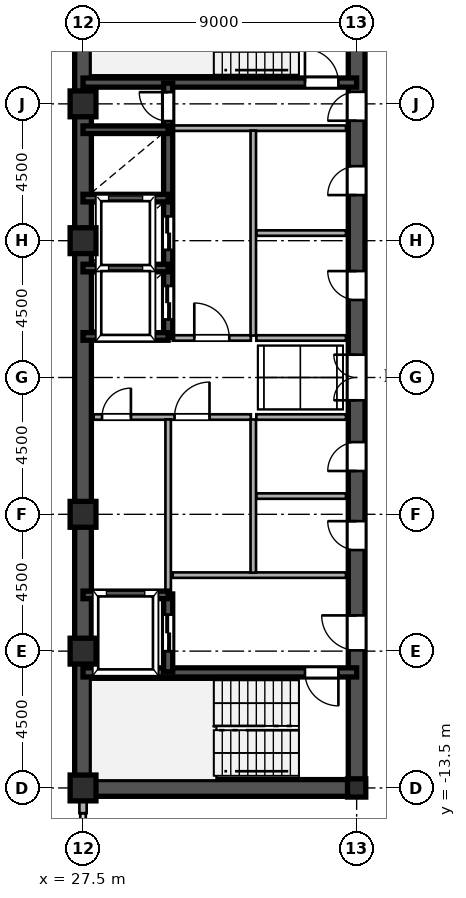
"""IFC4 building model, lengths in metres.
Left out: names, types, materials, properties, quantities, classifications, styles, units other than length and angle.
Written with IfcOpenShell. Run it as: python <this file> out.ifc"""

import sys

from ifc_helpers import new_model, si_unit, direction, frame, frame_2d, origin, origin_2d, place, context, subcontext, project, spatial, rectangle, hollow_rectangle, i_section, extrude, source, transform, mapped, element, fill, save


model = new_model("IFC4")
c1 = context("Model", 3, precision=1e-05, world=origin(), true_north=direction((0.0, 1.0)))
c2 = subcontext(c1, "Body", "Model", "MODEL_VIEW")
j1 = project(units=[si_unit("LENGTHUNIT", "METRE"), si_unit("PLANEANGLEUNIT", "RADIAN")], contexts=[c1])
p1 = place(None, origin())
s1 = spatial("IfcSite", under=j1, at=p1, CompositionType="ELEMENT")
p2 = place(p1, origin())
s2 = spatial("IfcBuilding", under=s1, at=p2, CompositionType="ELEMENT")
p3 = place(p2, frame((0.0, 0.0, 177.9)))
s3 = spatial("IfcBuildingStorey", under=s2, at=p3, CompositionType="ELEMENT", Elevation=177.9)
m1 = source(origin(), c2, "Body", "SweptSolid", [
    extrude(hollow_rectangle(XDim=0.85, YDim=0.85, WallThickness=0.036, at=origin_2d()), origin(), (0.0, 0.0, 1.0), 3.6),
])
for number, where, z_axis, x_axis in (
    (1, (27.5, -13.5, 0.0), (0.0, 0.0, 1.0), (1.0, 0.0, 0.0)),
    (2, (27.5, -9.0, 0.0), (0.0, 0.0, 1.0), (1.0, 0.0, 0.0)),
    (3, (27.5, -4.5, 0.0), (0.0, 0.0, 1.0), (1.0, 0.0, 0.0)),
    (4, (27.5, 4.5, 0.0), (0.0, 0.0, 1.0), (1.0, 0.0, 0.0)),
    (5, (27.5, 9.0, 0.0), (0.0, 0.0, 1.0), (1.0, 0.0, 0.0)),
):
    element("IfcColumn", number, at=place(p3, frame(where, z_axis=z_axis, x_axis=x_axis)), inside=s3, PredefinedType="COLUMN", context=c2, shape_type="MappedRepresentation", body=[
        mapped(m1, transform((0.0, 0.0, 0.0), scale=1.0)),
    ])
m2 = source(origin(), c2, "Body", "SweptSolid", [
    extrude(i_section(OverallWidth=0.6, OverallDepth=0.6, WebThickness=0.025, FlangeThickness=0.04, at=origin_2d()), origin(), (0.0, 0.0, 1.0), 3.6),
])
p4 = place(p3, frame((36.5, -13.5, 0.0), z_axis=(0.0, 0.0, 1.0), x_axis=(1.0, 0.0, 0.0)))
e6 = element("IfcColumn", 6, at=p4, inside=s3, PredefinedType="COLUMN", context=c2, shape_type="MappedRepresentation", body=[
    mapped(m2, transform((0.0, 0.0, 0.0), scale=1.0)),
])
p5 = place(p3, frame((27.5, -14.33, 0.0), z_axis=(0.0, 0.0, 1.0), x_axis=(0.0, 1.0, 0.0)))
e7 = element("IfcWall", 7, at=p5, inside=s3, PredefinedType="SOLIDWALL", context=c2, shape_type="SweptSolid", body=[
    extrude(rectangle(XDim=0.55, YDim=0.24, at=frame_2d((0.275, 0.0))), origin(), (0.0, 0.0, 1.0), 2.88),
])
for number, where, z_axis, x_axis in (
    (8, (27.5, -13.5, 0.0), (0.0, 0.0, 1.0), (0.0, 1.0, 0.0)),
    (9, (27.5, 1.3, 0.0), (0.0, 0.0, 1.0), (0.0, 1.0, 0.0)),
):
    element("IfcWall", number, at=place(p3, frame(where, z_axis=z_axis, x_axis=x_axis)), inside=s3, PredefinedType="SHEAR", context=c2, shape_type="SweptSolid", body=[
        extrude(rectangle(XDim=12.2, YDim=0.55, at=frame_2d((6.1, 0.0))), origin(), (0.0, 0.0, 1.0), 3.38),
    ])
p6 = place(p3, frame((27.5, -1.3, 0.0), z_axis=(0.0, 0.0, 1.0), x_axis=(0.0, 1.0, 0.0)))
e10 = element("IfcWall", 10, at=p6, inside=s3, PredefinedType="SHEAR", context=c2, shape_type="SweptSolid", body=[
    extrude(rectangle(XDim=2.6, YDim=0.55, at=frame_2d((1.3, 0.0))), origin(), (0.0, 0.0, 1.0), 3.38),
])
p7 = place(p3, frame((27.5, -13.5, 0.0), z_axis=(0.0, 0.0, 1.0), x_axis=(1.0, 0.0, 0.0)))
e11 = element("IfcWall", 11, at=p7, inside=s3, PredefinedType="SHEAR", context=c2, shape_type="SweptSolid", body=[
    extrude(rectangle(XDim=9.0, YDim=0.55, at=frame_2d((4.5, 0.0))), origin(), (0.0, 0.0, 1.0), 3.38),
])
p8 = place(p3, frame((36.5, -13.65, 0.0), z_axis=(0.0, 0.0, 1.0), x_axis=(0.0, 1.0, 0.0)))
e12 = element("IfcWall", 12, at=p8, inside=s3, PredefinedType="SHEAR", context=c2, shape_type="SweptSolid", body=[
    extrude(rectangle(XDim=7.15, YDim=0.55, at=frame_2d((3.575, 0.0))), origin(), (0.0, 0.0, 1.0), 3.38),
])
p9 = place(p8, frame((4.675, 0.0, 0.0)))
e13 = element("IfcOpeningElement", 13, at=p9, cuts=e12, PredefinedType="OPENING", context=c2, shape_type="SweptSolid", body=[
    extrude(rectangle(XDim=1.15, YDim=2.2, at=frame_2d((0.575, 1.1))), frame((0.0, 0.285, 0.0), z_axis=(0.0, -1.0, 0.0), x_axis=(1.0, 0.0, 0.0)), (0.0, 0.0, 1.0), 0.57),
])
p10 = place(p3, frame((36.5, -1.3, 0.0), z_axis=(0.0, 0.0, 1.0), x_axis=(0.0, 1.0, 0.0)))
e14 = element("IfcWall", 14, at=p10, inside=s3, PredefinedType="SHEAR", context=c2, shape_type="SweptSolid", body=[
    extrude(rectangle(XDim=2.6, YDim=0.55, at=frame_2d((1.3, 0.0))), origin(), (0.0, 0.0, 1.0), 3.38),
])
p11 = place(p10, frame((0.55, 0.0, 0.0)))
e15 = element("IfcOpeningElement", 15, at=p11, cuts=e14, PredefinedType="OPENING", context=c2, shape_type="SweptSolid", body=[
    extrude(rectangle(XDim=1.5, YDim=2.3, at=frame_2d((0.75, 1.15))), frame((0.0, 0.285, 0.0), z_axis=(0.0, -1.0, 0.0), x_axis=(1.0, 0.0, 0.0)), (0.0, 0.0, 1.0), 0.57),
])
p12 = place(p3, frame((36.5, 8.2, 0.0), z_axis=(0.0, 0.0, 1.0), x_axis=(0.0, 1.0, 0.0)))
e16 = element("IfcWall", 16, at=p12, inside=s3, PredefinedType="SHEAR", context=c2, shape_type="SweptSolid", body=[
    extrude(rectangle(XDim=5.45, YDim=0.55, at=frame_2d((2.725, 0.0))), origin(), (0.0, 0.0, 1.0), 3.38),
])
p13 = place(p12, frame((0.245, 0.0, 0.0)))
e17 = element("IfcOpeningElement", 17, at=p13, cuts=e16, PredefinedType="OPENING", context=c2, shape_type="SweptSolid", body=[
    extrude(rectangle(XDim=0.95, YDim=2.15, at=frame_2d((0.475, 1.075))), frame((0.0, 0.285, 0.0), z_axis=(0.0, -1.0, 0.0), x_axis=(1.0, 0.0, 0.0)), (0.0, 0.0, 1.0), 0.57),
])
p14 = place(p3, frame((36.5, -6.5, 0.0), z_axis=(0.0, 0.0, 1.0), x_axis=(0.0, 1.0, 0.0)))
e18 = element("IfcWall", 18, at=p14, inside=s3, PredefinedType="SHEAR", context=c2, shape_type="SweptSolid", body=[
    extrude(rectangle(XDim=2.6, YDim=0.55, at=frame_2d((1.3, 0.0))), origin(), (0.0, 0.0, 1.0), 3.38),
])
p15 = place(p14, frame((0.825, 0.0, 0.0)))
e19 = element("IfcOpeningElement", 19, at=p15, cuts=e18, PredefinedType="OPENING", context=c2, shape_type="SweptSolid", body=[
    extrude(rectangle(XDim=0.95, YDim=2.15, at=frame_2d((0.475, 1.075))), frame((0.0, 0.285, 0.0), z_axis=(0.0, -1.0, 0.0), x_axis=(1.0, 0.0, 0.0)), (0.0, 0.0, 1.0), 0.57),
])
p16 = place(p3, frame((36.5, -3.9, 0.0), z_axis=(0.0, 0.0, 1.0), x_axis=(0.0, 1.0, 0.0)))
e20 = element("IfcWall", 20, at=p16, inside=s3, PredefinedType="SHEAR", context=c2, shape_type="SweptSolid", body=[
    extrude(rectangle(XDim=2.6, YDim=0.55, at=frame_2d((1.3, 0.0))), origin(), (0.0, 0.0, 1.0), 3.38),
])
p17 = place(p16, frame((0.825, 0.0, 0.0)))
e21 = element("IfcOpeningElement", 21, at=p17, cuts=e20, PredefinedType="OPENING", context=c2, shape_type="SweptSolid", body=[
    extrude(rectangle(XDim=0.95, YDim=2.15, at=frame_2d((0.475, 1.075))), frame((0.0, 0.285, 0.0), z_axis=(0.0, -1.0, 0.0), x_axis=(1.0, 0.0, 0.0)), (0.0, 0.0, 1.0), 0.57),
])
p18 = place(p3, frame((36.5, 1.3, 0.0), z_axis=(0.0, 0.0, 1.0), x_axis=(0.0, 1.0, 0.0)))
e22 = element("IfcWall", 22, at=p18, inside=s3, PredefinedType="SHEAR", context=c2, shape_type="SweptSolid", body=[
    extrude(rectangle(XDim=3.45, YDim=0.55, at=frame_2d((1.725, 0.0))), origin(), (0.0, 0.0, 1.0), 3.38),
])
p19 = place(p18, frame((1.25, 0.0, 0.0)))
e23 = element("IfcOpeningElement", 23, at=p19, cuts=e22, PredefinedType="OPENING", context=c2, shape_type="SweptSolid", body=[
    extrude(rectangle(XDim=0.95, YDim=2.15, at=frame_2d((0.475, 1.075))), frame((0.0, 0.285, 0.0), z_axis=(0.0, -1.0, 0.0), x_axis=(1.0, 0.0, 0.0)), (0.0, 0.0, 1.0), 0.57),
])
p20 = place(p3, frame((36.5, 4.75, 0.0), z_axis=(0.0, 0.0, 1.0), x_axis=(0.0, 1.0, 0.0)))
e24 = element("IfcWall", 24, at=p20, inside=s3, PredefinedType="SHEAR", context=c2, shape_type="SweptSolid", body=[
    extrude(rectangle(XDim=3.45, YDim=0.55, at=frame_2d((1.725, 0.0))), origin(), (0.0, 0.0, 1.0), 3.38),
])
p21 = place(p20, frame((1.25, 0.0, 0.0)))
e25 = element("IfcOpeningElement", 25, at=p21, cuts=e24, PredefinedType="OPENING", context=c2, shape_type="SweptSolid", body=[
    extrude(rectangle(XDim=0.95, YDim=2.15, at=frame_2d((0.475, 1.075))), frame((0.0, 0.285, 0.0), z_axis=(0.0, -1.0, 0.0), x_axis=(1.0, 0.0, 0.0)), (0.0, 0.0, 1.0), 0.57),
])
p22 = place(p3, frame((27.5, -9.7, 0.0), z_axis=(0.0, 0.0, 1.0), x_axis=(1.0, 0.0, 0.0)))
e26 = element("IfcWall", 26, at=p22, inside=s3, PredefinedType="SHEAR", context=c2, shape_type="SweptSolid", body=[
    extrude(rectangle(XDim=9.0, YDim=0.3, at=frame_2d((4.5, 0.0))), origin(), (0.0, 0.0, 1.0), 3.38),
])
p23 = place(p22, frame((7.3, 0.0, 0.0)))
e27 = element("IfcOpeningElement", 27, at=p23, cuts=e26, PredefinedType="OPENING", context=c2, shape_type="SweptSolid", body=[
    extrude(rectangle(XDim=1.1, YDim=2.2, at=frame_2d((0.55, 1.1))), frame((0.0, 0.16, 0.0), z_axis=(0.0, -1.0, 0.0), x_axis=(1.0, 0.0, 0.0)), (0.0, 0.0, 1.0), 0.32),
])
p24 = place(p3, frame((27.5, 9.7, 0.0), z_axis=(0.0, 0.0, 1.0), x_axis=(1.0, 0.0, 0.0)))
e28 = element("IfcWall", 28, at=p24, inside=s3, PredefinedType="SHEAR", context=c2, shape_type="SweptSolid", body=[
    extrude(rectangle(XDim=9.0, YDim=0.3, at=frame_2d((4.5, 0.0))), origin(), (0.0, 0.0, 1.0), 3.38),
])
p25 = place(p24, frame((7.3, 0.0, 0.0)))
e29 = element("IfcOpeningElement", 29, at=p25, cuts=e28, PredefinedType="OPENING", context=c2, shape_type="SweptSolid", body=[
    extrude(rectangle(XDim=1.1, YDim=2.2, at=frame_2d((0.55, 1.1))), frame((0.0, 0.16, 0.0), z_axis=(0.0, -1.0, 0.0), x_axis=(1.0, 0.0, 0.0)), (0.0, 0.0, 1.0), 0.32),
])
for number, where, z_axis, x_axis in (
    (30, (27.5, -7.15, 0.0), (0.0, 0.0, 1.0), (1.0, 0.0, 0.0)),
    (31, (27.5, 1.35, 0.0), (0.0, 0.0, 1.0), (1.0, 0.0, 0.0)),
    (32, (27.5, 3.6, 0.0), (0.0, 0.0, 1.0), (1.0, 0.0, 0.0)),
    (33, (27.5, 5.9, 0.0), (0.0, 0.0, 1.0), (1.0, 0.0, 0.0)),
    (34, (27.5, 8.15, 0.0), (0.0, 0.0, 1.0), (1.0, 0.0, 0.0)),
):
    element("IfcWall", number, at=place(p3, frame(where, z_axis=z_axis, x_axis=x_axis)), inside=s3, PredefinedType="SHEAR", context=c2, shape_type="SweptSolid", body=[
        extrude(rectangle(XDim=2.8, YDim=0.25, at=frame_2d((1.4, 0.0))), origin(), (0.0, 0.0, 1.0), 3.38),
    ])
p26 = place(p3, frame((30.3, -9.68, 0.0), z_axis=(0.0, 0.0, 1.0), x_axis=(0.0, 1.0, 0.0)))
e35 = element("IfcWall", 35, at=p26, inside=s3, PredefinedType="SHEAR", context=c2, shape_type="SweptSolid", body=[
    extrude(rectangle(XDim=2.56, YDim=0.3, at=frame_2d((1.28, 0.0))), origin(), (0.0, 0.0, 1.0), 3.38),
])
p27 = place(p26, frame((0.68, 0.0, 0.0)))
e36 = element("IfcOpeningElement", 36, at=p27, cuts=e35, PredefinedType="OPENING", context=c2, shape_type="SweptSolid", body=[
    extrude(rectangle(XDim=1.2, YDim=2.25, at=frame_2d((0.6, 1.125))), frame((0.0, 0.16, 0.0), z_axis=(0.0, -1.0, 0.0), x_axis=(1.0, 0.0, 0.0)), (0.0, 0.0, 1.0), 0.32),
])
p28 = place(p3, frame((30.3, 1.32, 0.0), z_axis=(0.0, 0.0, 1.0), x_axis=(0.0, 1.0, 0.0)))
e37 = element("IfcWall", 37, at=p28, inside=s3, PredefinedType="SHEAR", context=c2, shape_type="SweptSolid", body=[
    extrude(rectangle(XDim=2.28, YDim=0.3, at=frame_2d((1.14, 0.0))), origin(), (0.0, 0.0, 1.0), 3.38),
])
p29 = place(p28, frame((0.59, 0.0, 0.0)))
e38 = element("IfcOpeningElement", 38, at=p29, cuts=e37, PredefinedType="OPENING", context=c2, shape_type="SweptSolid", body=[
    extrude(rectangle(XDim=1.1, YDim=2.2, at=frame_2d((0.55, 1.1))), frame((0.0, 0.16, 0.0), z_axis=(0.0, -1.0, 0.0), x_axis=(1.0, 0.0, 0.0)), (0.0, 0.0, 1.0), 0.32),
])
p30 = place(p3, frame((30.3, 3.6, 0.0), z_axis=(0.0, 0.0, 1.0), x_axis=(0.0, 1.0, 0.0)))
e39 = element("IfcWall", 39, at=p30, inside=s3, PredefinedType="SHEAR", context=c2, shape_type="SweptSolid", body=[
    extrude(rectangle(XDim=2.3, YDim=0.3, at=frame_2d((1.15, 0.0))), origin(), (0.0, 0.0, 1.0), 3.38),
])
p31 = place(p30, frame((0.6, 0.0, 0.0)))
e40 = element("IfcOpeningElement", 40, at=p31, cuts=e39, PredefinedType="OPENING", context=c2, shape_type="SweptSolid", body=[
    extrude(rectangle(XDim=1.1, YDim=2.2, at=frame_2d((0.55, 1.1))), frame((0.0, 0.16, 0.0), z_axis=(0.0, -1.0, 0.0), x_axis=(1.0, 0.0, 0.0)), (0.0, 0.0, 1.0), 0.32),
])
p32 = place(p3, frame((30.3, 5.9, 0.0), z_axis=(0.0, 0.0, 1.0), x_axis=(0.0, 1.0, 0.0)))
e41 = element("IfcWall", 41, at=p32, inside=s3, PredefinedType="SHEAR", context=c2, shape_type="SweptSolid", body=[
    extrude(rectangle(XDim=2.25, YDim=0.3, at=frame_2d((1.125, 0.0))), origin(), (0.0, 0.0, 1.0), 3.38),
])
p33 = place(p3, frame((30.3, 8.15, 0.0), z_axis=(0.0, 0.0, 1.0), x_axis=(0.0, 1.0, 0.0)))
e42 = element("IfcWall", 42, at=p33, inside=s3, PredefinedType="SHEAR", context=c2, shape_type="SweptSolid", body=[
    extrude(rectangle(XDim=1.53, YDim=0.3, at=frame_2d((0.765, 0.0))), origin(), (0.0, 0.0, 1.0), 3.38),
])
p34 = place(p33, frame((0.285, 0.0, 0.0)))
e43 = element("IfcOpeningElement", 43, at=p34, cuts=e42, PredefinedType="OPENING", context=c2, shape_type="SweptSolid", body=[
    extrude(rectangle(XDim=0.95, YDim=2.15, at=frame_2d((0.475, 1.075))), frame((0.0, 0.16, 0.0), z_axis=(0.0, -1.0, 0.0), x_axis=(1.0, 0.0, 0.0)), (0.0, 0.0, 1.0), 0.32),
])
for number, where, z_axis, x_axis in (
    (44, (30.45, -6.5, 0.0), (0.0, 0.0, 1.0), (1.0, 0.0, 0.0)),
    (45, (30.45, 8.2, 0.0), (0.0, 0.0, 1.0), (1.0, 0.0, 0.0)),
):
    element("IfcWall", number, at=place(p3, frame(where, z_axis=z_axis, x_axis=x_axis)), inside=s3, PredefinedType="PARTITIONING", context=c2, shape_type="SweptSolid", body=[
        extrude(rectangle(XDim=5.7, YDim=0.18, at=frame_2d((2.85, 0.0))), origin(), (0.0, 0.0, 1.0), 3.38),
    ])
p35 = place(p3, frame((33.1, -6.42, 0.0), z_axis=(0.0, 0.0, 1.0), x_axis=(0.0, 1.0, 0.0)))
e46 = element("IfcWall", 46, at=p35, inside=s3, PredefinedType="PARTITIONING", context=c2, shape_type="SweptSolid", body=[
    extrude(rectangle(XDim=5.04, YDim=0.18, at=frame_2d((2.52, 0.0))), origin(), (0.0, 0.0, 1.0), 3.38),
])
p36 = place(p3, frame((33.1, 1.38, 0.0), z_axis=(0.0, 0.0, 1.0), x_axis=(0.0, 1.0, 0.0)))
e47 = element("IfcWall", 47, at=p36, inside=s3, PredefinedType="PARTITIONING", context=c2, shape_type="SweptSolid", body=[
    extrude(rectangle(XDim=6.74, YDim=0.18, at=frame_2d((3.37, 0.0))), origin(), (0.0, 0.0, 1.0), 3.38),
])
p37 = place(p3, frame((27.85, -1.3, 0.0), z_axis=(0.0, 0.0, 1.0), x_axis=(1.0, 0.0, 0.0)))
e48 = element("IfcWall", 48, at=p37, inside=s3, PredefinedType="PARTITIONING", context=c2, shape_type="SweptSolid", body=[
    extrude(rectangle(XDim=2.45, YDim=0.18, at=frame_2d((1.225, 0.0))), origin(), (0.0, 0.0, 1.0), 3.38),
])
p38 = place(p37, frame((0.275, 0.0, 0.0)))
e49 = element("IfcOpeningElement", 49, at=p38, cuts=e48, PredefinedType="OPENING", context=c2, shape_type="SweptSolid", body=[
    extrude(rectangle(XDim=0.95, YDim=2.15, at=frame_2d((0.475, 1.075))), frame((0.0, 0.1, 0.0), z_axis=(0.0, -1.0, 0.0), x_axis=(1.0, 0.0, 0.0)), (0.0, 0.0, 1.0), 0.2),
])
p39 = place(p3, frame((30.3, -1.3, 0.0), z_axis=(0.0, 0.0, 1.0), x_axis=(1.0, 0.0, 0.0)))
e50 = element("IfcWall", 50, at=p39, inside=s3, PredefinedType="PARTITIONING", context=c2, shape_type="SweptSolid", body=[
    extrude(rectangle(XDim=2.72, YDim=0.18, at=frame_2d((1.36, 0.0))), origin(), (0.0, 0.0, 1.0), 3.38),
])
p40 = place(p39, frame((0.21, 0.0, 0.0)))
e51 = element("IfcOpeningElement", 51, at=p40, cuts=e50, PredefinedType="OPENING", context=c2, shape_type="SweptSolid", body=[
    extrude(rectangle(XDim=1.15, YDim=2.2, at=frame_2d((0.575, 1.1))), frame((0.0, 0.1, 0.0), z_axis=(0.0, -1.0, 0.0), x_axis=(1.0, 0.0, 0.0)), (0.0, 0.0, 1.0), 0.2),
])
p41 = place(p3, frame((30.3, -7.12, 0.0), z_axis=(0.0, 0.0, 1.0), x_axis=(0.0, 1.0, 0.0)))
e52 = element("IfcWall", 52, at=p41, inside=s3, PredefinedType="PARTITIONING", context=c2, shape_type="SweptSolid", body=[
    extrude(rectangle(XDim=5.74, YDim=0.18, at=frame_2d((2.87, 0.0))), origin(), (0.0, 0.0, 1.0), 3.38),
])
p42 = place(p3, frame((30.45, 1.3, 0.0), z_axis=(0.0, 0.0, 1.0), x_axis=(1.0, 0.0, 0.0)))
e53 = element("IfcWall", 53, at=p42, inside=s3, PredefinedType="PARTITIONING", context=c2, shape_type="SweptSolid", body=[
    extrude(rectangle(XDim=2.57, YDim=0.18, at=frame_2d((1.285, 0.0))), origin(), (0.0, 0.0, 1.0), 3.38),
])
p43 = place(p42, frame((0.71, 0.0, 0.0)))
e54 = element("IfcOpeningElement", 54, at=p43, cuts=e53, PredefinedType="OPENING", context=c2, shape_type="SweptSolid", body=[
    extrude(rectangle(XDim=1.15, YDim=2.2, at=frame_2d((0.575, 1.1))), frame((0.0, 0.1, 0.0), z_axis=(0.0, -1.0, 0.0), x_axis=(1.0, 0.0, 0.0)), (0.0, 0.0, 1.0), 0.2),
])
for number, where, z_axis, x_axis in (
    (55, (33.2, -1.3, 0.0), (0.0, 0.0, 1.0), (1.0, 0.0, 0.0)),
    (56, (33.2, 1.3, 0.0), (0.0, 0.0, 1.0), (1.0, 0.0, 0.0)),
    (57, (33.2, -3.9, 0.0), (0.0, 0.0, 1.0), (1.0, 0.0, 0.0)),
    (58, (33.2, 4.75, 0.0), (0.0, 0.0, 1.0), (1.0, 0.0, 0.0)),
):
    element("IfcWall", number, at=place(p3, frame(where, z_axis=z_axis, x_axis=x_axis)), inside=s3, PredefinedType="PARTITIONING", context=c2, shape_type="SweptSolid", body=[
        extrude(rectangle(XDim=2.95, YDim=0.18, at=frame_2d((1.475, 0.0))), origin(), (0.0, 0.0, 1.0), 3.38),
    ])
m3 = source(origin(), c2, "Body", "SweptSolid", [
    extrude(rectangle(XDim=1.15, YDim=2.2, at=frame_2d((0.575, 1.1))), frame((0.0, 0.025, 0.0), z_axis=(0.0, -1.0, 0.0), x_axis=(1.0, 0.0, 0.0)), (0.0, 0.0, 1.0), 0.05),
])
p44 = place(p9, origin())
e59 = element("IfcDoor", 59, at=p44, inside=s3, OperationType="SINGLE_SWING_RIGHT", PredefinedType="DOOR", context=c2, shape_type="MappedRepresentation", body=[
    mapped(m3, transform((0.0, 0.0, 0.0), scale=1.0)),
])
fill(e13, e59)
m4 = source(origin(), c2, "Body", "SweptSolid", [
    extrude(rectangle(XDim=1.5, YDim=2.3, at=frame_2d((0.75, 1.15))), frame((0.0, 0.025, 0.0), z_axis=(0.0, -1.0, 0.0), x_axis=(1.0, 0.0, 0.0)), (0.0, 0.0, 1.0), 0.05),
])
p45 = place(p11, origin())
e60 = element("IfcDoor", 60, at=p45, inside=s3, OperationType="DOUBLE_SWING_LEFT", PredefinedType="DOOR", context=c2, shape_type="MappedRepresentation", body=[
    mapped(m4, transform((0.0, 0.0, 0.0), scale=1.0)),
])
fill(e15, e60)
m5 = source(origin(), c2, "Body", "SweptSolid", [
    extrude(rectangle(XDim=0.95, YDim=2.15, at=frame_2d((0.475, 1.075))), frame((0.0, 0.025, 0.0), z_axis=(0.0, -1.0, 0.0), x_axis=(1.0, 0.0, 0.0)), (0.0, 0.0, 1.0), 0.05),
])
p46 = place(p13, origin())
e61 = element("IfcDoor", 61, at=p46, inside=s3, OperationType="SINGLE_SWING_LEFT", PredefinedType="DOOR", context=c2, shape_type="MappedRepresentation", body=[
    mapped(m5, transform((0.0, 0.0, 0.0), scale=1.0)),
])
fill(e17, e61)
p47 = place(p15, origin())
e62 = element("IfcDoor", 62, at=p47, inside=s3, OperationType="SINGLE_SWING_RIGHT", PredefinedType="DOOR", context=c2, shape_type="MappedRepresentation", body=[
    mapped(m5, transform((0.0, 0.0, 0.0), scale=1.0)),
])
fill(e19, e62)
p48 = place(p17, origin())
e63 = element("IfcDoor", 63, at=p48, inside=s3, OperationType="SINGLE_SWING_LEFT", PredefinedType="DOOR", context=c2, shape_type="MappedRepresentation", body=[
    mapped(m5, transform((0.0, 0.0, 0.0), scale=1.0)),
])
fill(e21, e63)
p49 = place(p19, origin())
e64 = element("IfcDoor", 64, at=p49, inside=s3, OperationType="SINGLE_SWING_RIGHT", PredefinedType="DOOR", context=c2, shape_type="MappedRepresentation", body=[
    mapped(m5, transform((0.0, 0.0, 0.0), scale=1.0)),
])
fill(e23, e64)
p50 = place(p21, origin())
e65 = element("IfcDoor", 65, at=p50, inside=s3, OperationType="SINGLE_SWING_LEFT", PredefinedType="DOOR", context=c2, shape_type="MappedRepresentation", body=[
    mapped(m5, transform((0.0, 0.0, 0.0), scale=1.0)),
])
fill(e25, e65)
m6 = source(origin(), c2, "Body", "SweptSolid", [
    extrude(rectangle(XDim=1.1, YDim=2.2, at=frame_2d((0.55, 1.1))), frame((0.0, 0.025, 0.0), z_axis=(0.0, -1.0, 0.0), x_axis=(1.0, 0.0, 0.0)), (0.0, 0.0, 1.0), 0.05),
])
p51 = place(p23, frame((1.1, 0.0, 0.0), z_axis=(0.0, 0.0, 1.0), x_axis=(-1.0, 0.0, 0.0)))
e66 = element("IfcDoor", 66, at=p51, inside=s3, OperationType="SINGLE_SWING_RIGHT", PredefinedType="DOOR", context=c2, shape_type="MappedRepresentation", body=[
    mapped(m6, transform((0.0, 0.0, 0.0), scale=1.0)),
])
fill(e27, e66)
p52 = place(p25, origin())
e67 = element("IfcDoor", 67, at=p52, inside=s3, OperationType="SINGLE_SWING_LEFT", PredefinedType="DOOR", context=c2, shape_type="MappedRepresentation", body=[
    mapped(m6, transform((0.0, 0.0, 0.0), scale=1.0)),
])
fill(e29, e67)
m7 = source(origin(), c2, "Body", "SweptSolid", [
    extrude(rectangle(XDim=1.2, YDim=2.25, at=frame_2d((0.6, 1.125))), frame((0.0, 0.025, 0.0), z_axis=(0.0, -1.0, 0.0), x_axis=(1.0, 0.0, 0.0)), (0.0, 0.0, 1.0), 0.05),
])
p53 = place(p27, origin())
e68 = element("IfcDoor", 68, at=p53, inside=s3, OperationType="DOUBLE_DOOR_SLIDING", PredefinedType="DOOR", context=c2, shape_type="MappedRepresentation", body=[
    mapped(m7, transform((0.0, 0.0, 0.0), scale=1.0)),
])
fill(e36, e68)
m8 = source(origin(), c2, "Body", "SweptSolid", [
    extrude(rectangle(XDim=1.1, YDim=2.2, at=frame_2d((0.55, 1.1))), frame((0.0, 0.025, 0.0), z_axis=(0.0, -1.0, 0.0), x_axis=(1.0, 0.0, 0.0)), (0.0, 0.0, 1.0), 0.05),
])
p54 = place(p29, origin())
e69 = element("IfcDoor", 69, at=p54, inside=s3, OperationType="DOUBLE_DOOR_SLIDING", PredefinedType="DOOR", context=c2, shape_type="MappedRepresentation", body=[
    mapped(m8, transform((0.0, 0.0, 0.0), scale=1.0)),
])
fill(e38, e69)
p55 = place(p31, origin())
e70 = element("IfcDoor", 70, at=p55, inside=s3, OperationType="DOUBLE_DOOR_SLIDING", PredefinedType="DOOR", context=c2, shape_type="MappedRepresentation", body=[
    mapped(m8, transform((0.0, 0.0, 0.0), scale=1.0)),
])
fill(e40, e70)
p56 = place(p34, origin())
e71 = element("IfcDoor", 71, at=p56, inside=s3, OperationType="SINGLE_SWING_RIGHT", PredefinedType="DOOR", context=c2, shape_type="MappedRepresentation", body=[
    mapped(m5, transform((0.0, 0.0, 0.0), scale=1.0)),
])
fill(e43, e71)
p57 = place(p38, origin())
e72 = element("IfcDoor", 72, at=p57, inside=s3, OperationType="SINGLE_SWING_RIGHT", PredefinedType="DOOR", context=c2, shape_type="MappedRepresentation", body=[
    mapped(m5, transform((0.0, 0.0, 0.0), scale=1.0)),
])
fill(e49, e72)
p58 = place(p40, origin())
e73 = element("IfcDoor", 73, at=p58, inside=s3, OperationType="SINGLE_SWING_RIGHT", PredefinedType="DOOR", context=c2, shape_type="MappedRepresentation", body=[
    mapped(m3, transform((0.0, 0.0, 0.0), scale=1.0)),
])
fill(e51, e73)
p59 = place(p43, origin())
e74 = element("IfcDoor", 74, at=p59, inside=s3, OperationType="SINGLE_SWING_LEFT", PredefinedType="DOOR", context=c2, shape_type="MappedRepresentation", body=[
    mapped(m3, transform((0.0, 0.0, 0.0), scale=1.0)),
])
fill(e54, e74)
save(model, sys.argv[1])
